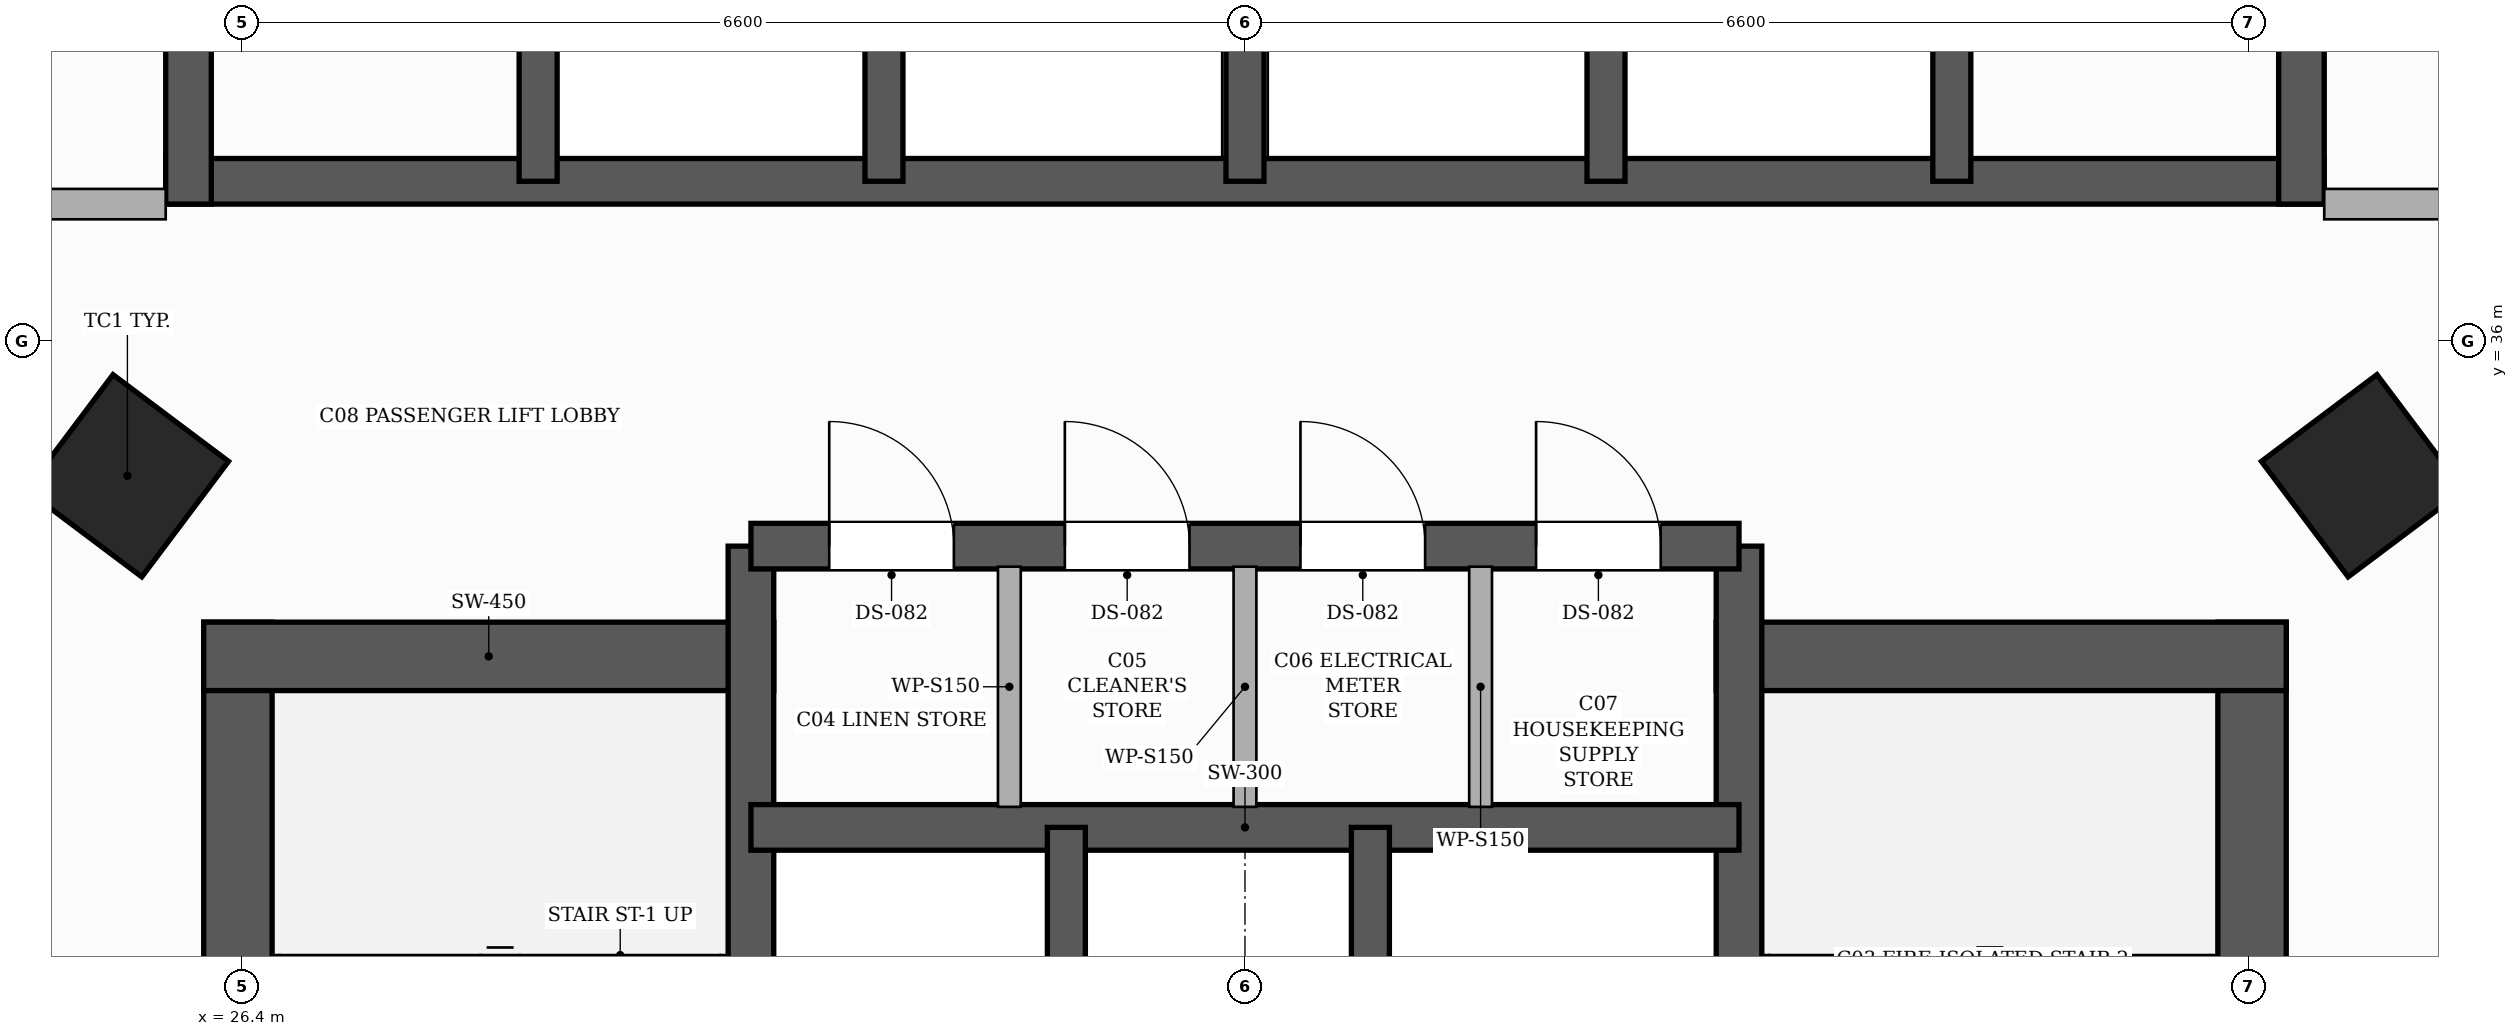
"""IFC4 building model, lengths in metres.
Left out: names, types, materials, properties, quantities, classifications, styles, units other than length and angle.
Written with IfcOpenShell. Run it as: python <this file> out.ifc"""

import sys

from ifc_helpers import new_model, si_unit, direction, frame, frame_2d, origin, origin_2d, place, context, subcontext, project, spatial, rectangle, hollow_rectangle, extrude, element, fill, save


model = new_model("IFC4")
c1 = context("Model", 3, precision=1e-05, world=origin(), true_north=direction((0.0, 1.0)))
c2 = subcontext(c1, "Body", "Model", "MODEL_VIEW")
j1 = project(units=[si_unit("LENGTHUNIT", "METRE"), si_unit("PLANEANGLEUNIT", "RADIAN")], contexts=[c1])
p1 = place(None, origin())
s1 = spatial("IfcSite", under=j1, at=p1, CompositionType="ELEMENT")
p2 = place(p1, origin())
s2 = spatial("IfcBuilding", under=s1, at=p2, CompositionType="ELEMENT")
p3 = place(p2, frame((0.0, 0.0, 101.6)))
s3 = spatial("IfcBuildingStorey", under=s2, at=p3, CompositionType="ELEMENT", Elevation=101.6)
p4 = place(p3, frame((26.375, 26.45, 0.0), z_axis=(0.0, 0.0, 1.0), x_axis=(0.0, 1.0, 0.0)))
e1 = element("IfcWall", 1, at=p4, inside=s3, PredefinedType="SHEAR", context=c2, shape_type="SweptSolid", body=[
    extrude(rectangle(XDim=7.7, YDim=0.45, at=frame_2d((3.85, 0.0))), origin(), (0.0, 0.0, 1.0), 5.1),
])
p5 = place(p3, frame((26.15, 33.925, 0.0), z_axis=(0.0, 0.0, 1.0), x_axis=(1.0, 0.0, 0.0)))
e2 = element("IfcWall", 2, at=p5, inside=s3, PredefinedType="SHEAR", context=c2, shape_type="SweptSolid", body=[
    extrude(rectangle(XDim=3.75, YDim=0.45, at=frame_2d((1.875, 0.0))), origin(), (0.0, 0.0, 1.0), 5.1),
])
p6 = place(p3, frame((39.625, 26.45, 0.0), z_axis=(0.0, 0.0, 1.0), x_axis=(0.0, 1.0, 0.0)))
e3 = element("IfcWall", 3, at=p6, inside=s3, PredefinedType="SHEAR", context=c2, shape_type="SweptSolid", body=[
    extrude(rectangle(XDim=7.7, YDim=0.45, at=frame_2d((3.85, 0.0))), origin(), (0.0, 0.0, 1.0), 5.1),
])
p7 = place(p3, frame((36.1, 33.925, 0.0), z_axis=(0.0, 0.0, 1.0), x_axis=(1.0, 0.0, 0.0)))
e4 = element("IfcWall", 4, at=p7, inside=s3, PredefinedType="SHEAR", context=c2, shape_type="SweptSolid", body=[
    extrude(rectangle(XDim=3.75, YDim=0.45, at=frame_2d((1.875, 0.0))), origin(), (0.0, 0.0, 1.0), 5.1),
])
p8 = place(p3, frame((29.75, 26.45, 0.0), z_axis=(0.0, 0.0, 1.0), x_axis=(0.0, 1.0, 0.0)))
e5 = element("IfcWall", 5, at=p8, inside=s3, PredefinedType="SHEAR", context=c2, shape_type="SweptSolid", body=[
    extrude(rectangle(XDim=8.2, YDim=0.3, at=frame_2d((4.1, 0.0))), origin(), (0.0, 0.0, 1.0), 5.1),
])
p9 = place(p8, frame((0.6, 0.0, 0.0)))
e6 = element("IfcOpeningElement", 6, at=p9, cuts=e5, PredefinedType="OPENING", context=c2, shape_type="SweptSolid", body=[
    extrude(rectangle(XDim=1.05, YDim=2.15, at=frame_2d((0.525, 1.075))), frame((0.0, 0.16, 0.0), z_axis=(0.0, -1.0, 0.0), x_axis=(1.0, 0.0, 0.0)), (0.0, 0.0, 1.0), 0.32),
])
p10 = place(p3, frame((36.25, 26.45, 0.0), z_axis=(0.0, 0.0, 1.0), x_axis=(0.0, 1.0, 0.0)))
e7 = element("IfcWall", 7, at=p10, inside=s3, PredefinedType="SHEAR", context=c2, shape_type="SweptSolid", body=[
    extrude(rectangle(XDim=8.2, YDim=0.3, at=frame_2d((4.1, 0.0))), origin(), (0.0, 0.0, 1.0), 5.1),
])
p11 = place(p10, frame((0.6, 0.0, 0.0)))
e8 = element("IfcOpeningElement", 8, at=p11, cuts=e7, PredefinedType="OPENING", context=c2, shape_type="SweptSolid", body=[
    extrude(rectangle(XDim=1.05, YDim=2.15, at=frame_2d((0.525, 1.075))), frame((0.0, 0.16, 0.0), z_axis=(0.0, -1.0, 0.0), x_axis=(1.0, 0.0, 0.0)), (0.0, 0.0, 1.0), 0.32),
])
p12 = place(p3, frame((29.75, 32.8, 0.0), z_axis=(0.0, 0.0, 1.0), x_axis=(1.0, 0.0, 0.0)))
e9 = element("IfcWall", 9, at=p12, inside=s3, PredefinedType="SHEAR", context=c2, shape_type="SweptSolid", body=[
    extrude(rectangle(XDim=6.5, YDim=0.3, at=frame_2d((3.25, 0.0))), origin(), (0.0, 0.0, 1.0), 5.1),
])
for number, where, z_axis, x_axis in (
    (10, (31.825, 29.9, 0.0), (0.0, 0.0, 1.0), (0.0, 1.0, 0.0)),
    (11, (33.825, 29.9, 0.0), (0.0, 0.0, 1.0), (0.0, 1.0, 0.0)),
):
    element("IfcWall", number, at=place(p3, frame(where, z_axis=z_axis, x_axis=x_axis)), inside=s3, PredefinedType="SHEAR", context=c2, shape_type="SweptSolid", body=[
        extrude(rectangle(XDim=2.9, YDim=0.25, at=frame_2d((1.45, 0.0))), origin(), (0.0, 0.0, 1.0), 5.1),
    ])
p13 = place(p3, frame((29.75, 34.65, 0.0), z_axis=(0.0, 0.0, 1.0), x_axis=(1.0, 0.0, 0.0)))
e12 = element("IfcWall", 12, at=p13, inside=s3, PredefinedType="SHEAR", context=c2, shape_type="SweptSolid", body=[
    extrude(rectangle(XDim=6.5, YDim=0.3, at=frame_2d((3.25, 0.0))), origin(), (0.0, 0.0, 1.0), 5.1),
])
p14 = place(p13, frame((0.515, 0.0, 0.0)))
e13 = element("IfcOpeningElement", 13, at=p14, cuts=e12, PredefinedType="OPENING", context=c2, shape_type="SweptSolid", body=[
    extrude(rectangle(XDim=0.82, YDim=2.1, at=frame_2d((0.41, 1.05))), frame((0.0, 0.16, 0.0), z_axis=(0.0, -1.0, 0.0), x_axis=(1.0, 0.0, 0.0)), (0.0, 0.0, 1.0), 0.32),
])
p15 = place(p13, frame((2.065, 0.0, 0.0)))
e14 = element("IfcOpeningElement", 14, at=p15, cuts=e12, PredefinedType="OPENING", context=c2, shape_type="SweptSolid", body=[
    extrude(rectangle(XDim=0.82, YDim=2.1, at=frame_2d((0.41, 1.05))), frame((0.0, 0.16, 0.0), z_axis=(0.0, -1.0, 0.0), x_axis=(1.0, 0.0, 0.0)), (0.0, 0.0, 1.0), 0.32),
])
p16 = place(p13, frame((3.615, 0.0, 0.0)))
e15 = element("IfcOpeningElement", 15, at=p16, cuts=e12, PredefinedType="OPENING", context=c2, shape_type="SweptSolid", body=[
    extrude(rectangle(XDim=0.82, YDim=2.1, at=frame_2d((0.41, 1.05))), frame((0.0, 0.16, 0.0), z_axis=(0.0, -1.0, 0.0), x_axis=(1.0, 0.0, 0.0)), (0.0, 0.0, 1.0), 0.32),
])
p17 = place(p13, frame((5.165, 0.0, 0.0)))
e16 = element("IfcOpeningElement", 16, at=p17, cuts=e12, PredefinedType="OPENING", context=c2, shape_type="SweptSolid", body=[
    extrude(rectangle(XDim=0.82, YDim=2.1, at=frame_2d((0.41, 1.05))), frame((0.0, 0.16, 0.0), z_axis=(0.0, -1.0, 0.0), x_axis=(1.0, 0.0, 0.0)), (0.0, 0.0, 1.0), 0.32),
])
p18 = place(p3, frame((40.1, 37.05, 0.0), z_axis=(0.0, 0.0, 1.0), x_axis=(-1.0, 0.0, 0.0)))
e17 = element("IfcWall", 17, at=p18, inside=s3, PredefinedType="SHEAR", context=c2, shape_type="SweptSolid", body=[
    extrude(rectangle(XDim=14.2, YDim=0.3, at=frame_2d((7.1, 0.0))), origin(), (0.0, 0.0, 1.0), 5.1),
])
for number, where, z_axis, x_axis in (
    (18, (26.05, 36.9, 0.0), (0.0, 0.0, 1.0), (0.0, 1.0, 0.0)),
    (19, (39.95, 36.9, 0.0), (0.0, 0.0, 1.0), (0.0, 1.0, 0.0)),
):
    element("IfcWall", number, at=place(p3, frame(where, z_axis=z_axis, x_axis=x_axis)), inside=s3, PredefinedType="SHEAR", context=c2, shape_type="SweptSolid", body=[
        extrude(rectangle(XDim=2.85, YDim=0.3, at=frame_2d((1.425, 0.0))), origin(), (0.0, 0.0, 1.0), 5.1),
    ])
for number, where, z_axis, x_axis in (
    (20, (28.35, 37.05, 0.0), (0.0, 0.0, 1.0), (0.0, 1.0, 0.0)),
    (21, (30.625, 37.05, 0.0), (0.0, 0.0, 1.0), (0.0, 1.0, 0.0)),
    (22, (33.0, 37.05, 0.0), (0.0, 0.0, 1.0), (0.0, 1.0, 0.0)),
    (23, (35.375, 37.05, 0.0), (0.0, 0.0, 1.0), (0.0, 1.0, 0.0)),
    (24, (37.65, 37.05, 0.0), (0.0, 0.0, 1.0), (0.0, 1.0, 0.0)),
):
    element("IfcWall", number, at=place(p3, frame(where, z_axis=z_axis, x_axis=x_axis)), inside=s3, PredefinedType="SHEAR", context=c2, shape_type="SweptSolid", body=[
        extrude(rectangle(XDim=2.55, YDim=0.25, at=frame_2d((1.275, 0.0))), origin(), (0.0, 0.0, 1.0), 5.1),
    ])
for number, where, z_axis, x_axis in (
    (25, (25.648, 35.113, 0.0), (0.0, 0.0, 1.0), (0.6, 0.8, 0.0)),
    (26, (40.352, 35.113, 0.0), (0.0, 0.0, 1.0), (-0.6, 0.8, 0.0)),
):
    element("IfcColumn", number, at=place(p3, frame(where, z_axis=z_axis, x_axis=x_axis)), inside=s3, PredefinedType="COLUMN", context=c2, shape_type="SweptSolid", body=[
        extrude(hollow_rectangle(XDim=0.95, YDim=0.95, WallThickness=0.032, at=origin_2d()), origin(), (0.0, 0.0, 1.0), 5.1),
    ])
p19 = place(p3, frame((27.023, 44.285, 0.0), z_axis=(0.0, 0.0, 1.0), x_axis=(-0.596844342512, -0.802357046963, 0.0)))
e27 = element("IfcWall", 27, at=p19, inside=s3, PredefinedType="SOLIDWALL", context=c2, shape_type="SweptSolid", body=[
    extrude(rectangle(XDim=11.901, YDim=0.24, at=frame_2d((5.95, 0.0))), origin(), (0.0, 0.0, 1.0), 4.424),
])
p20 = place(p3, frame((46.081, 34.736, 0.0), z_axis=(0.0, 0.0, 1.0), x_axis=(-0.607712631042, 0.794157010969, 0.0)))
e28 = element("IfcWall", 28, at=p20, inside=s3, PredefinedType="SOLIDWALL", context=c2, shape_type="SweptSolid", body=[
    extrude(rectangle(XDim=17.844, YDim=0.24, at=frame_2d((8.922, 0.0))), origin(), (0.0, 0.0, 1.0), 4.424),
])
for number, where, z_axis, x_axis in (
    (29, (31.45, 32.935, 0.0), (0.0, 0.0, 1.0), (0.0, 1.0, 0.0)),
    (30, (33.0, 32.935, 0.0), (0.0, 0.0, 1.0), (0.0, 1.0, 0.0)),
    (31, (34.55, 32.935, 0.0), (0.0, 0.0, 1.0), (0.0, 1.0, 0.0)),
):
    element("IfcWall", number, at=place(p3, frame(where, z_axis=z_axis, x_axis=x_axis)), inside=s3, PredefinedType="PARTITIONING", context=c2, shape_type="SweptSolid", body=[
        extrude(rectangle(XDim=1.58, YDim=0.15, at=frame_2d((0.79, 0.0))), origin(), (0.0, 0.0, 1.0), 4.86),
    ])
p21 = place(p3, frame((23.435, 36.9, 0.0), z_axis=(0.0, 0.0, 1.0), x_axis=(1.0, 0.0, 0.0)))
e32 = element("IfcWall", 32, at=p21, inside=s3, PredefinedType="PARTITIONING", context=c2, shape_type="SweptSolid", body=[
    extrude(rectangle(XDim=2.465, YDim=0.2, at=frame_2d((1.232, 0.0))), origin(), (0.0, 0.0, 1.0), 4.125),
])
p22 = place(p3, frame((40.1, 36.9, 0.0), z_axis=(0.0, 0.0, 1.0), x_axis=(1.0, 0.0, 0.0)))
e33 = element("IfcWall", 33, at=p22, inside=s3, PredefinedType="PARTITIONING", context=c2, shape_type="SweptSolid", body=[
    extrude(rectangle(XDim=2.55, YDim=0.2, at=frame_2d((1.275, 0.0))), origin(), (0.0, 0.0, 1.0), 4.125),
])
p23 = place(p14, origin())
e34 = element("IfcDoor", 34, at=p23, inside=s3, OperationType="SINGLE_SWING_LEFT", PredefinedType="DOOR", context=c2, shape_type="SweptSolid", body=[
    extrude(rectangle(XDim=0.82, YDim=2.1, at=frame_2d((0.41, 1.05))), frame((0.0, 0.025, 0.0), z_axis=(0.0, -1.0, 0.0), x_axis=(1.0, 0.0, 0.0)), (0.0, 0.0, 1.0), 0.05),
])
fill(e13, e34)
p24 = place(p15, origin())
e35 = element("IfcDoor", 35, at=p24, inside=s3, OperationType="SINGLE_SWING_LEFT", PredefinedType="DOOR", context=c2, shape_type="SweptSolid", body=[
    extrude(rectangle(XDim=0.82, YDim=2.1, at=frame_2d((0.41, 1.05))), frame((0.0, 0.025, 0.0), z_axis=(0.0, -1.0, 0.0), x_axis=(1.0, 0.0, 0.0)), (0.0, 0.0, 1.0), 0.05),
])
fill(e14, e35)
p25 = place(p16, origin())
e36 = element("IfcDoor", 36, at=p25, inside=s3, OperationType="SINGLE_SWING_LEFT", PredefinedType="DOOR", context=c2, shape_type="SweptSolid", body=[
    extrude(rectangle(XDim=0.82, YDim=2.1, at=frame_2d((0.41, 1.05))), frame((0.0, 0.025, 0.0), z_axis=(0.0, -1.0, 0.0), x_axis=(1.0, 0.0, 0.0)), (0.0, 0.0, 1.0), 0.05),
])
fill(e15, e36)
p26 = place(p17, origin())
e37 = element("IfcDoor", 37, at=p26, inside=s3, OperationType="SINGLE_SWING_LEFT", PredefinedType="DOOR", context=c2, shape_type="SweptSolid", body=[
    extrude(rectangle(XDim=0.82, YDim=2.1, at=frame_2d((0.41, 1.05))), frame((0.0, 0.025, 0.0), z_axis=(0.0, -1.0, 0.0), x_axis=(1.0, 0.0, 0.0)), (0.0, 0.0, 1.0), 0.05),
])
fill(e16, e37)
save(model, sys.argv[1])
